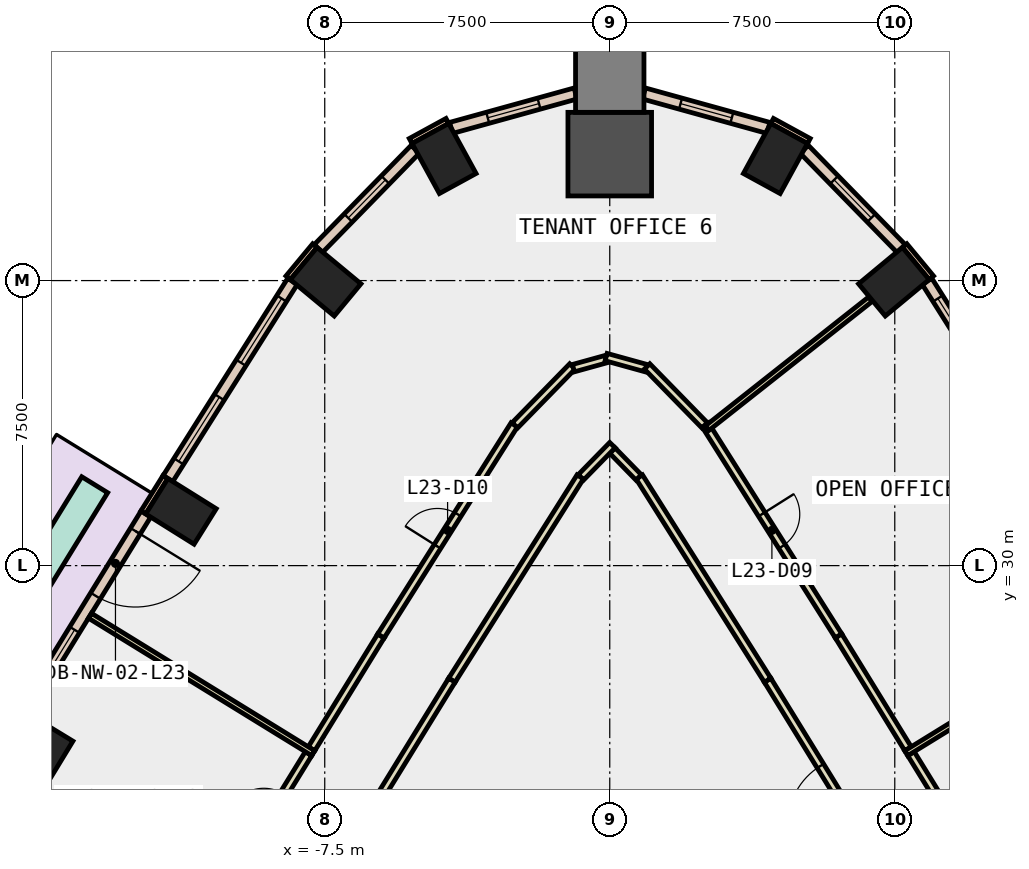
"""IFC4 building model, lengths in metres.
Left out: names, types, materials, properties, quantities, classifications, styles, units other than length and angle.
Written with IfcOpenShell. Run it as: python <this file> out.ifc"""

import sys

from ifc_helpers import new_model, si_unit, direction, frame, frame_2d, origin, origin_2d, place, context, subcontext, project, spatial, rectangle, extrude, element, fill, save


model = new_model("IFC4")
c1 = context("Model", 3, precision=1e-05, world=origin(), true_north=direction((0.0, 1.0)))
c2 = subcontext(c1, "Body", "Model", "MODEL_VIEW")
j1 = project(units=[si_unit("LENGTHUNIT", "METRE"), si_unit("PLANEANGLEUNIT", "RADIAN")], contexts=[c1])
p1 = place(None, origin())
s1 = spatial("IfcSite", under=j1, at=p1, CompositionType="ELEMENT")
p2 = place(p1, origin())
s2 = spatial("IfcBuilding", under=s1, at=p2, CompositionType="ELEMENT")
p3 = place(p2, frame((0.0, 0.0, 107.6)))
s3 = spatial("IfcBuildingStorey", under=s2, at=p3, CompositionType="ELEMENT", Elevation=107.6)
for number, where, z_axis, x_axis in (
    (1, (7.476, 37.47, -0.4), (0.0, 0.0, 1.0), (-0.638, 0.77, 0.0)),
    (2, (4.36, 40.712, -0.4), (0.0, 0.0, 1.0), (-0.877, 0.48, 0.0)),
):
    element("IfcColumn", number, at=place(p3, frame(where, z_axis=z_axis, x_axis=x_axis)), inside=s3, PredefinedType="COLUMN", context=c2, shape_type="SweptSolid", body=[
        extrude(rectangle(XDim=1.1, YDim=1.5, at=origin_2d()), origin(), (0.0, 0.0, 1.0), 4.2),
    ])
p4 = place(p3, frame((0.0, 40.827, -0.4), z_axis=(0.0, 0.0, 1.0), x_axis=(0.0, 1.0, 0.0)))
e3 = element("IfcColumn", 3, at=p4, inside=s3, PredefinedType="COLUMN", context=c2, shape_type="SweptSolid", body=[
    extrude(rectangle(XDim=2.2, YDim=2.2, at=origin_2d()), origin(), (0.0, 0.0, 1.0), 4.2),
])
for number, where, z_axis, x_axis in (
    (4, (-4.36, 40.712, -0.4), (0.0, 0.0, 1.0), (0.877, 0.48, 0.0)),
    (5, (-7.476, 37.47, -0.4), (0.0, 0.0, 1.0), (0.638, 0.77, 0.0)),
    (6, (-11.283, 31.428, -0.4), (0.0, 0.0, 1.0), (0.53, 0.848, 0.0)),
    (7, (-15.053, 25.302, -0.4), (0.0, 0.0, 1.0), (0.52, 0.854, 0.0)),
):
    element("IfcColumn", number, at=place(p3, frame(where, z_axis=z_axis, x_axis=x_axis)), inside=s3, PredefinedType="COLUMN", context=c2, shape_type="SweptSolid", body=[
        extrude(rectangle(XDim=1.1, YDim=1.5, at=origin_2d()), origin(), (0.0, 0.0, 1.0), 4.2),
    ])
p5 = place(p3, frame((0.0, 42.827, -0.4), z_axis=(0.0, 0.0, 1.0), x_axis=(0.0, 1.0, 0.0)))
e8 = element("IfcColumn", 8, at=p5, inside=s3, PredefinedType="COLUMN", context=c2, shape_type="SweptSolid", body=[
    extrude(rectangle(XDim=1.8, YDim=1.8, at=origin_2d()), origin(), (0.0, 0.0, 1.0), 4.2),
])
for number, where, z_axis, x_axis in (
    (9, (5.239, 41.172, 0.0), (0.0, 0.0, 1.0), (-0.878, 0.479, 0.0)),
    (10, (-4.273, 41.7, 0.0), (0.0, 0.0, 1.0), (-0.878, -0.479, 0.0)),
):
    element("IfcWall", number, at=place(p3, frame(where, z_axis=z_axis, x_axis=x_axis)), inside=s3, PredefinedType="STANDARD", context=c2, shape_type="SweptSolid", body=[
        extrude(rectangle(XDim=1.101, YDim=0.15, at=frame_2d((0.55, 0.0))), origin(), (0.0, 0.0, 1.0), 3.8),
    ])
for number, where, z_axis, x_axis in (
    (11, (8.462, 37.574, 0.0), (0.0, 0.0, 1.0), (-0.639, 0.77, 0.0)),
    (12, (-7.76, 38.42, 0.0), (0.0, 0.0, 1.0), (-0.639, -0.77, 0.0)),
):
    element("IfcWall", number, at=place(p3, frame(where, z_axis=z_axis, x_axis=x_axis)), inside=s3, PredefinedType="STANDARD", context=c2, shape_type="SweptSolid", body=[
        extrude(rectangle(XDim=1.099, YDim=0.15, at=frame_2d((0.55, 0.0))), origin(), (0.0, 0.0, 1.0), 3.8),
    ])
p6 = place(p3, frame((-11.691, 32.332, 0.0), z_axis=(0.0, 0.0, 1.0), x_axis=(-0.529879262372, -0.848073090782, 0.0)))
e13 = element("IfcWall", 13, at=p6, inside=s3, PredefinedType="STANDARD", context=c2, shape_type="SweptSolid", body=[
    extrude(rectangle(XDim=1.1, YDim=0.15, at=frame_2d((0.55, 0.0))), origin(), (0.0, 0.0, 1.0), 3.8),
])
p7 = place(p3, frame((11.626, 32.29, 0.0), z_axis=(0.0, 0.0, 1.0), x_axis=(-0.534018429465, 0.845472836342, 0.0)))
e14 = element("IfcWall", 14, at=p7, inside=s3, PredefinedType="STANDARD", context=c2, shape_type="SweptSolid", body=[
    extrude(rectangle(XDim=6.138, YDim=0.3, at=frame_2d((3.069, 0.0))), origin(), (0.0, 0.0, 1.0), 3.8),
])
p8 = place(p7, frame((0.535, 0.0, 0.9)))
e15 = element("IfcOpeningElement", 15, at=p8, cuts=e14, PredefinedType="OPENING", context=c2, shape_type="SweptSolid", body=[
    extrude(rectangle(XDim=2.0, YDim=2.6, at=frame_2d((1.0, 1.3))), frame((0.0, 0.16, 0.0), z_axis=(0.0, -1.0, 0.0), x_axis=(1.0, 0.0, 0.0)), (0.0, 0.0, 1.0), 0.32),
])
p9 = place(p7, frame((3.604, 0.0, 0.9)))
e16 = element("IfcOpeningElement", 16, at=p9, cuts=e14, PredefinedType="OPENING", context=c2, shape_type="SweptSolid", body=[
    extrude(rectangle(XDim=2.0, YDim=2.6, at=frame_2d((1.0, 1.3))), frame((0.0, 0.16, 0.0), z_axis=(0.0, -1.0, 0.0), x_axis=(1.0, 0.0, 0.0)), (0.0, 0.0, 1.0), 0.32),
])
p10 = place(p3, frame((7.668, 38.343, 0.0), z_axis=(0.0, 0.0, 1.0), x_axis=(-0.698695735804, 0.715418946331, 0.0)))
e17 = element("IfcWall", 17, at=p10, inside=s3, PredefinedType="STANDARD", context=c2, shape_type="SweptSolid", body=[
    extrude(rectangle(XDim=3.65, YDim=0.3, at=frame_2d((1.825, 0.0))), origin(), (0.0, 0.0, 1.0), 3.8),
])
p11 = place(p10, frame((1.125, 0.0, 0.9)))
e18 = element("IfcOpeningElement", 18, at=p11, cuts=e17, PredefinedType="OPENING", context=c2, shape_type="SweptSolid", body=[
    extrude(rectangle(XDim=1.4, YDim=2.6, at=frame_2d((0.7, 1.3))), frame((0.0, 0.16, 0.0), z_axis=(0.0, -1.0, 0.0), x_axis=(1.0, 0.0, 0.0)), (0.0, 0.0, 1.0), 0.32),
])
p12 = place(p3, frame((4.175, 41.517, 0.0), z_axis=(0.0, 0.0, 1.0), x_axis=(-0.963822898894, 0.266543466562, 0.0)))
e19 = element("IfcWall", 19, at=p12, inside=s3, PredefinedType="STANDARD", context=c2, shape_type="SweptSolid", body=[
    extrude(rectangle(XDim=3.399, YDim=0.3, at=frame_2d((1.7, 0.0))), origin(), (0.0, 0.0, 1.0), 3.8),
])
p13 = place(p12, frame((0.999, 0.0, 0.9)))
e20 = element("IfcOpeningElement", 20, at=p13, cuts=e19, PredefinedType="OPENING", context=c2, shape_type="SweptSolid", body=[
    extrude(rectangle(XDim=1.4, YDim=2.6, at=frame_2d((0.7, 1.3))), frame((0.0, 0.16, 0.0), z_axis=(0.0, -1.0, 0.0), x_axis=(1.0, 0.0, 0.0)), (0.0, 0.0, 1.0), 0.32),
])
p14 = place(p3, frame((-0.899, 42.423, 0.0), z_axis=(0.0, 0.0, 1.0), x_axis=(-0.963822898894, -0.266543466562, 0.0)))
e21 = element("IfcWall", 21, at=p14, inside=s3, PredefinedType="STANDARD", context=c2, shape_type="SweptSolid", body=[
    extrude(rectangle(XDim=3.399, YDim=0.3, at=frame_2d((1.7, 0.0))), origin(), (0.0, 0.0, 1.0), 3.8),
])
p15 = place(p14, frame((0.999, 0.0, 0.9)))
e22 = element("IfcOpeningElement", 22, at=p15, cuts=e21, PredefinedType="OPENING", context=c2, shape_type="SweptSolid", body=[
    extrude(rectangle(XDim=1.4, YDim=2.6, at=frame_2d((0.7, 1.3))), frame((0.0, 0.16, 0.0), z_axis=(0.0, -1.0, 0.0), x_axis=(1.0, 0.0, 0.0)), (0.0, 0.0, 1.0), 0.32),
])
p16 = place(p3, frame((-5.118, 40.954, 0.0), z_axis=(0.0, 0.0, 1.0), x_axis=(-0.698695735804, -0.715418946331, 0.0)))
e23 = element("IfcWall", 23, at=p16, inside=s3, PredefinedType="STANDARD", context=c2, shape_type="SweptSolid", body=[
    extrude(rectangle(XDim=3.65, YDim=0.3, at=frame_2d((1.825, 0.0))), origin(), (0.0, 0.0, 1.0), 3.8),
])
p17 = place(p16, frame((1.125, 0.0, 0.9)))
e24 = element("IfcOpeningElement", 24, at=p17, cuts=e23, PredefinedType="OPENING", context=c2, shape_type="SweptSolid", body=[
    extrude(rectangle(XDim=1.4, YDim=2.6, at=frame_2d((0.7, 1.3))), frame((0.0, 0.16, 0.0), z_axis=(0.0, -1.0, 0.0), x_axis=(1.0, 0.0, 0.0)), (0.0, 0.0, 1.0), 0.32),
])
p18 = place(p3, frame((-8.348, 37.48, 0.0), z_axis=(0.0, 0.0, 1.0), x_axis=(-0.534018429465, -0.845472836342, 0.0)))
e25 = element("IfcWall", 25, at=p18, inside=s3, PredefinedType="STANDARD", context=c2, shape_type="SweptSolid", body=[
    extrude(rectangle(XDim=6.138, YDim=0.3, at=frame_2d((3.069, 0.0))), origin(), (0.0, 0.0, 1.0), 3.8),
])
p19 = place(p18, frame((0.535, 0.0, 0.9)))
e26 = element("IfcOpeningElement", 26, at=p19, cuts=e25, PredefinedType="OPENING", context=c2, shape_type="SweptSolid", body=[
    extrude(rectangle(XDim=2.0, YDim=2.6, at=frame_2d((1.0, 1.3))), frame((0.0, 0.16, 0.0), z_axis=(0.0, -1.0, 0.0), x_axis=(1.0, 0.0, 0.0)), (0.0, 0.0, 1.0), 0.32),
])
p20 = place(p18, frame((3.604, 0.0, 0.9)))
e27 = element("IfcOpeningElement", 27, at=p20, cuts=e25, PredefinedType="OPENING", context=c2, shape_type="SweptSolid", body=[
    extrude(rectangle(XDim=2.0, YDim=2.6, at=frame_2d((1.0, 1.3))), frame((0.0, 0.16, 0.0), z_axis=(0.0, -1.0, 0.0), x_axis=(1.0, 0.0, 0.0)), (0.0, 0.0, 1.0), 0.32),
])
p21 = place(p3, frame((-12.207, 31.358, 0.0), z_axis=(0.0, 0.0, 1.0), x_axis=(-0.524121974895, -0.851643208998, 0.0)))
e28 = element("IfcWall", 28, at=p21, inside=s3, PredefinedType="STANDARD", context=c2, shape_type="SweptSolid", body=[
    extrude(rectangle(XDim=6.104, YDim=0.3, at=frame_2d((3.052, 0.0))), origin(), (0.0, 0.0, 1.0), 3.8),
])
p22 = place(p21, frame((0.526, 0.0, 0.0)))
e29 = element("IfcOpeningElement", 29, at=p22, cuts=e28, PredefinedType="OPENING", context=c2, shape_type="SweptSolid", body=[
    extrude(rectangle(XDim=2.0, YDim=2.4, at=frame_2d((1.0, 1.2))), frame((0.0, 0.16, 0.0), z_axis=(0.0, -1.0, 0.0), x_axis=(1.0, 0.0, 0.0)), (0.0, 0.0, 1.0), 0.32),
])
p23 = place(p21, frame((3.578, 0.0, 0.9)))
e30 = element("IfcOpeningElement", 30, at=p23, cuts=e28, PredefinedType="OPENING", context=c2, shape_type="SweptSolid", body=[
    extrude(rectangle(XDim=2.0, YDim=2.6, at=frame_2d((1.0, 1.3))), frame((0.0, 0.16, 0.0), z_axis=(0.0, -1.0, 0.0), x_axis=(1.0, 0.0, 0.0)), (0.0, 0.0, 1.0), 0.32),
])
p24 = place(p3, frame((-13.553, 32.128, 0.0), z_axis=(0.0, 0.0, 1.0), x_axis=(-0.524156413099, -0.851622013928, 0.0)))
e31 = element("IfcWall", 31, at=p24, inside=s3, PredefinedType="STANDARD", context=c2, shape_type="SweptSolid", body=[
    extrude(rectangle(XDim=6.004, YDim=0.8, at=frame_2d((3.002, 0.0))), origin(), (0.0, 0.0, 1.0), 0.8),
])
p25 = place(p3, frame((7.875, 20.94, 0.0), z_axis=(0.0, 0.0, 1.0), x_axis=(-0.524183774504, 0.851605172921, 0.0)))
e32 = element("IfcWall", 32, at=p25, inside=s3, PredefinedType="PARTITIONING", context=c2, shape_type="SweptSolid", body=[
    extrude(rectangle(XDim=7.099, YDim=0.2, at=frame_2d((3.549, 0.0))), origin(), (0.0, 0.0, 1.0), 3.8),
])
p26 = place(p25, frame((2.649, 0.0, 0.0)))
e33 = element("IfcOpeningElement", 33, at=p26, cuts=e32, PredefinedType="OPENING", context=c2, shape_type="SweptSolid", body=[
    extrude(rectangle(XDim=1.8, YDim=2.1, at=frame_2d((0.9, 1.05))), frame((0.0, 0.11, 0.0), z_axis=(0.0, -1.0, 0.0), x_axis=(1.0, 0.0, 0.0)), (0.0, 0.0, 1.0), 0.22),
])
p27 = place(p3, frame((4.154, 26.985, 0.0), z_axis=(0.0, 0.0, 1.0), x_axis=(-0.53384777413, 0.84558060175, 0.0)))
e34 = element("IfcWall", 34, at=p27, inside=s3, PredefinedType="PARTITIONING", context=c2, shape_type="SweptSolid", body=[
    extrude(rectangle(XDim=6.326, YDim=0.2, at=frame_2d((3.163, 0.0))), origin(), (0.0, 0.0, 1.0), 3.8),
])
p28 = place(p3, frame((0.76, 32.321, 0.0), z_axis=(0.0, 0.0, 1.0), x_axis=(-0.698898447714, 0.715220916769, 0.0)))
e35 = element("IfcWall", 35, at=p28, inside=s3, PredefinedType="PARTITIONING", context=c2, shape_type="SweptSolid", body=[
    extrude(rectangle(XDim=0.987, YDim=0.2, at=frame_2d((0.494, 0.0))), origin(), (0.0, 0.0, 1.0), 3.8),
])
p29 = place(p3, frame((0.07, 33.17, 0.0), z_axis=(0.0, 0.0, 1.0), x_axis=(-0.699145664909, -0.714979257908, 0.0)))
e36 = element("IfcWall", 36, at=p29, inside=s3, PredefinedType="PARTITIONING", context=c2, shape_type="SweptSolid", body=[
    extrude(rectangle(XDim=1.187, YDim=0.2, at=frame_2d((0.594, 0.0))), origin(), (0.0, 0.0, 1.0), 3.8),
])
p30 = place(p3, frame((-0.777, 32.334, 0.0), z_axis=(0.0, 0.0, 1.0), x_axis=(-0.53384777413, -0.84558060175, 0.0)))
e37 = element("IfcWall", 37, at=p30, inside=s3, PredefinedType="PARTITIONING", context=c2, shape_type="SweptSolid", body=[
    extrude(rectangle(XDim=6.326, YDim=0.2, at=frame_2d((3.163, 0.0))), origin(), (0.0, 0.0, 1.0), 3.8),
])
p31 = place(p3, frame((-4.154, 26.985, 0.0), z_axis=(0.0, 0.0, 1.0), x_axis=(-0.524183774504, -0.851605172921, 0.0)))
e38 = element("IfcWall", 38, at=p31, inside=s3, PredefinedType="PARTITIONING", context=c2, shape_type="SweptSolid", body=[
    extrude(rectangle(XDim=7.099, YDim=0.2, at=frame_2d((3.549, 0.0))), origin(), (0.0, 0.0, 1.0), 3.8),
])
p32 = place(p3, frame((7.927, 25.052, 0.0), z_axis=(0.0, 0.0, 1.0), x_axis=(0.524140390501, -0.851631875311, 0.0)))
e39 = element("IfcWall", 39, at=p32, inside=s3, PredefinedType="PARTITIONING", context=c2, shape_type="SweptSolid", body=[
    extrude(rectangle(XDim=3.487, YDim=0.2, at=frame_2d((1.744, 0.0))), origin(), (0.0, 0.0, 1.0), 3.8),
])
p33 = place(p3, frame((2.513, 33.705, 0.0), z_axis=(0.0, 0.0, 1.0), x_axis=(0.533874165031, -0.845563939577, 0.0)))
e40 = element("IfcWall", 40, at=p33, inside=s3, PredefinedType="PARTITIONING", context=c2, shape_type="SweptSolid", body=[
    extrude(rectangle(XDim=6.571, YDim=0.2, at=frame_2d((3.286, 0.0))), origin(), (0.0, 0.0, 1.0), 3.8),
])
p34 = place(p33, frame((2.785, 0.0, 0.0)))
e41 = element("IfcOpeningElement", 41, at=p34, cuts=e40, PredefinedType="OPENING", context=c2, shape_type="SweptSolid", body=[
    extrude(rectangle(XDim=1.0, YDim=2.1, at=frame_2d((0.5, 1.05))), frame((0.0, 0.11, 0.0), z_axis=(0.0, -1.0, 0.0), x_axis=(1.0, 0.0, 0.0)), (0.0, 0.0, 1.0), 0.22),
])
for number, where, z_axis, x_axis in (
    (42, (6.021, 28.149, 0.0), (0.0, 0.0, 1.0), (0.524, -0.852, 0.0)),
    (43, (-7.848, 25.18, 0.0), (0.0, 0.0, 1.0), (0.524, 0.852, 0.0)),
):
    element("IfcWall", number, at=place(p3, frame(where, z_axis=z_axis, x_axis=x_axis)), inside=s3, PredefinedType="PARTITIONING", context=c2, shape_type="SweptSolid", body=[
        extrude(rectangle(XDim=3.486, YDim=0.2, at=frame_2d((1.743, 0.0))), origin(), (0.0, 0.0, 1.0), 3.8),
    ])
p35 = place(p3, frame((-6.021, 28.149, 0.0), z_axis=(0.0, 0.0, 1.0), x_axis=(0.533874165031, 0.845563939577, 0.0)))
e44 = element("IfcWall", 44, at=p35, inside=s3, PredefinedType="PARTITIONING", context=c2, shape_type="SweptSolid", body=[
    extrude(rectangle(XDim=6.571, YDim=0.2, at=frame_2d((3.286, 0.0))), origin(), (0.0, 0.0, 1.0), 3.8),
])
p36 = place(p35, frame((2.785, 0.0, 0.0)))
e45 = element("IfcOpeningElement", 45, at=p36, cuts=e44, PredefinedType="OPENING", context=c2, shape_type="SweptSolid", body=[
    extrude(rectangle(XDim=1.0, YDim=2.1, at=frame_2d((0.5, 1.05))), frame((0.0, 0.11, 0.0), z_axis=(0.0, -1.0, 0.0), x_axis=(1.0, 0.0, 0.0)), (0.0, 0.0, 1.0), 0.22),
])
p37 = place(p3, frame((-2.496, 33.692, 0.0), z_axis=(0.0, 0.0, 1.0), x_axis=(0.698771726105, 0.715344724449, 0.0)))
e46 = element("IfcWall", 46, at=p37, inside=s3, PredefinedType="PARTITIONING", context=c2, shape_type="SweptSolid", body=[
    extrude(rectangle(XDim=2.166, YDim=0.2, at=frame_2d((1.083, 0.0))), origin(), (0.0, 0.0, 1.0), 3.8),
])
p38 = place(p3, frame((-0.956, 35.196, 0.0), z_axis=(0.0, 0.0, 1.0), x_axis=(0.963772226389, 0.266726630919, 0.0)))
e47 = element("IfcWall", 47, at=p38, inside=s3, PredefinedType="PARTITIONING", context=c2, shape_type="SweptSolid", body=[
    extrude(rectangle(XDim=0.892, YDim=0.2, at=frame_2d((0.446, 0.0))), origin(), (0.0, 0.0, 1.0), 3.8),
])
p39 = place(p3, frame((-0.096, 35.487, 0.0), z_axis=(0.0, 0.0, 1.0), x_axis=(0.963802560401, -0.266616999767, 0.0)))
e48 = element("IfcWall", 48, at=p39, inside=s3, PredefinedType="PARTITIONING", context=c2, shape_type="SweptSolid", body=[
    extrude(rectangle(XDim=1.092, YDim=0.2, at=frame_2d((0.546, 0.0))), origin(), (0.0, 0.0, 1.0), 3.8),
])
p40 = place(p3, frame((0.983, 35.241, 0.0), z_axis=(0.0, 0.0, 1.0), x_axis=(0.698771726105, -0.715344724449, 0.0)))
e49 = element("IfcWall", 49, at=p40, inside=s3, PredefinedType="PARTITIONING", context=c2, shape_type="SweptSolid", body=[
    extrude(rectangle(XDim=2.166, YDim=0.2, at=frame_2d((1.083, 0.0))), origin(), (0.0, 0.0, 1.0), 3.8),
])
p41 = place(p3, frame((-9.755, 22.082, 0.0), z_axis=(0.0, 0.0, 1.0), x_axis=(0.524140390501, 0.851631875311, 0.0)))
e50 = element("IfcWall", 50, at=p41, inside=s3, PredefinedType="PARTITIONING", context=c2, shape_type="SweptSolid", body=[
    extrude(rectangle(XDim=3.487, YDim=0.2, at=frame_2d((1.744, 0.0))), origin(), (0.0, 0.0, 1.0), 3.8),
])
p42 = place(p41, frame((1.244, 0.0, 0.0)))
e51 = element("IfcOpeningElement", 51, at=p42, cuts=e50, PredefinedType="OPENING", context=c2, shape_type="SweptSolid", body=[
    extrude(rectangle(XDim=1.0, YDim=2.1, at=frame_2d((0.5, 1.05))), frame((0.0, 0.11, 0.0), z_axis=(0.0, -1.0, 0.0), x_axis=(1.0, 0.0, 0.0)), (0.0, 0.0, 1.0), 0.22),
])
p43 = place(p3, frame((7.802, 25.064, 0.0), z_axis=(0.0, 0.0, 1.0), x_axis=(0.851596352662, 0.524198103901, 0.0)))
e52 = element("IfcWall", 52, at=p43, inside=s3, PredefinedType="PARTITIONING", context=c2, shape_type="SweptSolid", body=[
    extrude(rectangle(XDim=6.9, YDim=0.15, at=frame_2d((3.45, 0.0))), origin(), (0.0, 0.0, 1.0), 3.8),
])
p44 = place(p3, frame((2.566, 33.62, 0.0), z_axis=(0.0, 0.0, 1.0), x_axis=(0.784838195876, 0.619700739304, 0.0)))
e53 = element("IfcWall", 53, at=p44, inside=s3, PredefinedType="PARTITIONING", context=c2, shape_type="SweptSolid", body=[
    extrude(rectangle(XDim=5.469, YDim=0.15, at=frame_2d((2.734, 0.0))), origin(), (0.0, 0.0, 1.0), 3.8),
])
p45 = place(p3, frame((-7.802, 25.064, 0.0), z_axis=(0.0, 0.0, 1.0), x_axis=(-0.851596352662, 0.524198103901, 0.0)))
e54 = element("IfcWall", 54, at=p45, inside=s3, PredefinedType="PARTITIONING", context=c2, shape_type="SweptSolid", body=[
    extrude(rectangle(XDim=6.9, YDim=0.15, at=frame_2d((3.45, 0.0))), origin(), (0.0, 0.0, 1.0), 3.8),
])
p46 = place(p9, origin())
e55 = element("IfcWindow", 55, at=p46, inside=s3, PartitioningType="SINGLE_PANEL", PredefinedType="WINDOW", context=c2, shape_type="SweptSolid", body=[
    extrude(rectangle(XDim=2.0, YDim=2.6, at=frame_2d((1.0, 1.3))), frame((0.0, 0.03, 0.0), z_axis=(0.0, -1.0, 0.0), x_axis=(1.0, 0.0, 0.0)), (0.0, 0.0, 1.0), 0.06),
])
fill(e16, e55)
p47 = place(p11, origin())
e56 = element("IfcWindow", 56, at=p47, inside=s3, PartitioningType="SINGLE_PANEL", PredefinedType="WINDOW", context=c2, shape_type="SweptSolid", body=[
    extrude(rectangle(XDim=1.4, YDim=2.6, at=frame_2d((0.7, 1.3))), frame((0.0, 0.03, 0.0), z_axis=(0.0, -1.0, 0.0), x_axis=(1.0, 0.0, 0.0)), (0.0, 0.0, 1.0), 0.06),
])
fill(e18, e56)
p48 = place(p13, origin())
e57 = element("IfcWindow", 57, at=p48, inside=s3, PartitioningType="SINGLE_PANEL", PredefinedType="WINDOW", context=c2, shape_type="SweptSolid", body=[
    extrude(rectangle(XDim=1.4, YDim=2.6, at=frame_2d((0.7, 1.3))), frame((0.0, 0.03, 0.0), z_axis=(0.0, -1.0, 0.0), x_axis=(1.0, 0.0, 0.0)), (0.0, 0.0, 1.0), 0.06),
])
fill(e20, e57)
p49 = place(p15, origin())
e58 = element("IfcWindow", 58, at=p49, inside=s3, PartitioningType="SINGLE_PANEL", PredefinedType="WINDOW", context=c2, shape_type="SweptSolid", body=[
    extrude(rectangle(XDim=1.4, YDim=2.6, at=frame_2d((0.7, 1.3))), frame((0.0, 0.03, 0.0), z_axis=(0.0, -1.0, 0.0), x_axis=(1.0, 0.0, 0.0)), (0.0, 0.0, 1.0), 0.06),
])
fill(e22, e58)
p50 = place(p17, origin())
e59 = element("IfcWindow", 59, at=p50, inside=s3, PartitioningType="SINGLE_PANEL", PredefinedType="WINDOW", context=c2, shape_type="SweptSolid", body=[
    extrude(rectangle(XDim=1.4, YDim=2.6, at=frame_2d((0.7, 1.3))), frame((0.0, 0.03, 0.0), z_axis=(0.0, -1.0, 0.0), x_axis=(1.0, 0.0, 0.0)), (0.0, 0.0, 1.0), 0.06),
])
fill(e24, e59)
p51 = place(p19, origin())
e60 = element("IfcWindow", 60, at=p51, inside=s3, PartitioningType="SINGLE_PANEL", PredefinedType="WINDOW", context=c2, shape_type="SweptSolid", body=[
    extrude(rectangle(XDim=2.0, YDim=2.6, at=frame_2d((1.0, 1.3))), frame((0.0, 0.03, 0.0), z_axis=(0.0, -1.0, 0.0), x_axis=(1.0, 0.0, 0.0)), (0.0, 0.0, 1.0), 0.06),
])
fill(e26, e60)
p52 = place(p20, origin())
e61 = element("IfcWindow", 61, at=p52, inside=s3, PartitioningType="SINGLE_PANEL", PredefinedType="WINDOW", context=c2, shape_type="SweptSolid", body=[
    extrude(rectangle(XDim=2.0, YDim=2.6, at=frame_2d((1.0, 1.3))), frame((0.0, 0.03, 0.0), z_axis=(0.0, -1.0, 0.0), x_axis=(1.0, 0.0, 0.0)), (0.0, 0.0, 1.0), 0.06),
])
fill(e27, e61)
p53 = place(p22, origin())
e62 = element("IfcDoor", 62, at=p53, inside=s3, OperationType="SLIDING_TO_LEFT", PredefinedType="DOOR", context=c2, shape_type="SweptSolid", body=[
    extrude(rectangle(XDim=2.0, YDim=2.4, at=frame_2d((1.0, 1.2))), frame((0.0, 0.025, 0.0), z_axis=(0.0, -1.0, 0.0), x_axis=(1.0, 0.0, 0.0)), (0.0, 0.0, 1.0), 0.05),
])
fill(e29, e62)
p54 = place(p23, origin())
e63 = element("IfcWindow", 63, at=p54, inside=s3, PartitioningType="SINGLE_PANEL", PredefinedType="WINDOW", context=c2, shape_type="SweptSolid", body=[
    extrude(rectangle(XDim=2.0, YDim=2.6, at=frame_2d((1.0, 1.3))), frame((0.0, 0.03, 0.0), z_axis=(0.0, -1.0, 0.0), x_axis=(1.0, 0.0, 0.0)), (0.0, 0.0, 1.0), 0.06),
])
fill(e30, e63)
p55 = place(p34, origin())
e64 = element("IfcDoor", 64, at=p55, inside=s3, OperationType="SINGLE_SWING_LEFT", PredefinedType="DOOR", context=c2, shape_type="SweptSolid", body=[
    extrude(rectangle(XDim=1.0, YDim=2.1, at=frame_2d((0.5, 1.05))), frame((0.0, 0.025, 0.0), z_axis=(0.0, -1.0, 0.0), x_axis=(1.0, 0.0, 0.0)), (0.0, 0.0, 1.0), 0.05),
])
fill(e41, e64)
p56 = place(p36, origin())
e65 = element("IfcDoor", 65, at=p56, inside=s3, OperationType="SINGLE_SWING_LEFT", PredefinedType="DOOR", context=c2, shape_type="SweptSolid", body=[
    extrude(rectangle(XDim=1.0, YDim=2.1, at=frame_2d((0.5, 1.05))), frame((0.0, 0.025, 0.0), z_axis=(0.0, -1.0, 0.0), x_axis=(1.0, 0.0, 0.0)), (0.0, 0.0, 1.0), 0.05),
])
fill(e45, e65)
p57 = place(p26, origin())
e66 = element("IfcDoor", 66, at=p57, inside=s3, OperationType="DOUBLE_DOOR_SINGLE_SWING", PredefinedType="DOOR", context=c2, shape_type="SweptSolid", body=[
    extrude(rectangle(XDim=1.8, YDim=2.1, at=frame_2d((0.9, 1.05))), frame((0.0, 0.025, 0.0), z_axis=(0.0, -1.0, 0.0), x_axis=(1.0, 0.0, 0.0)), (0.0, 0.0, 1.0), 0.05),
])
fill(e33, e66)
save(model, sys.argv[1])
